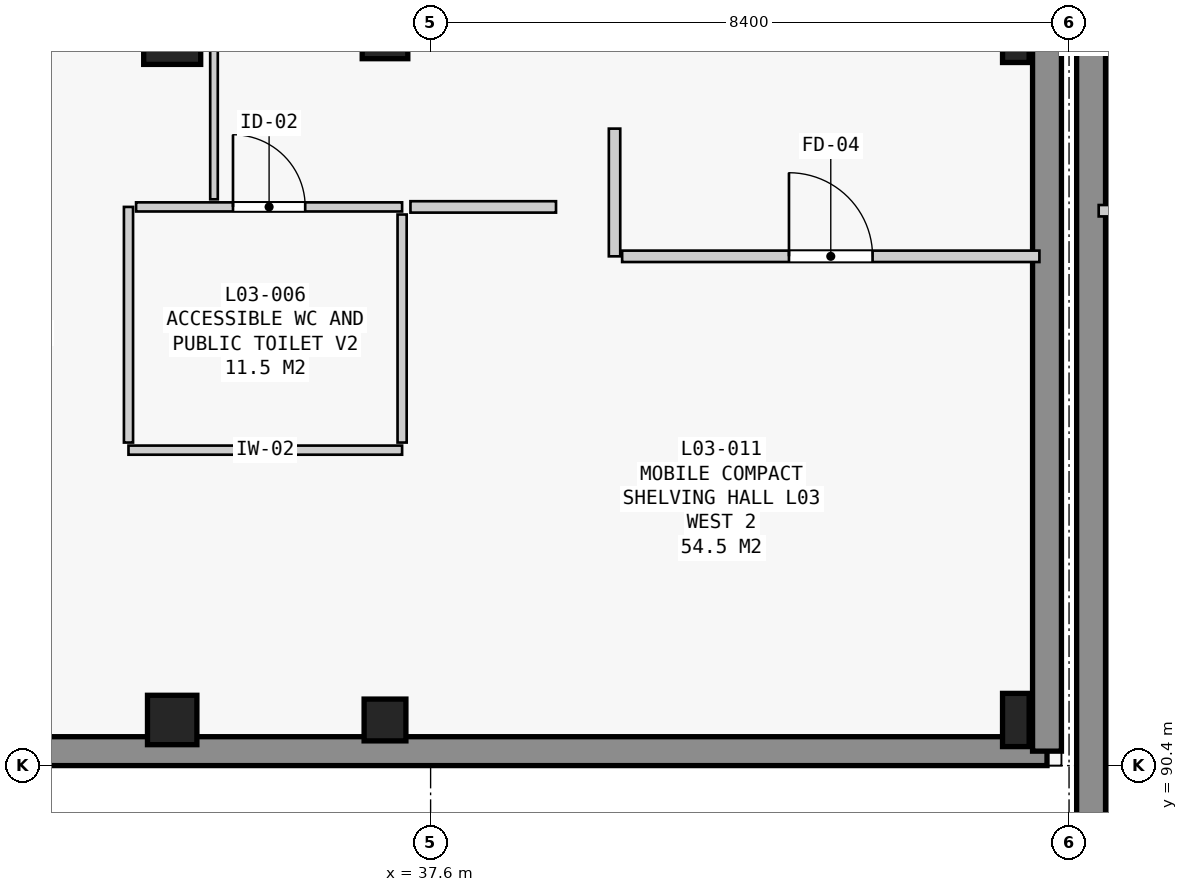
"""IFC4 building model, lengths in metres.
Left out: names, types, materials, properties, quantities, classifications, styles, units other than length and angle.
Written with IfcOpenShell. Run it as: python <this file> out.ifc"""

import sys

from ifc_helpers import new_model, si_unit, direction, frame, frame_2d, origin, origin_2d, place, context, subcontext, project, spatial, rectangle, extrude, element, fill, save


model = new_model("IFC4")
c1 = context("Model", 3, precision=1e-05, world=origin(), true_north=direction((0.0, 1.0)))
c2 = subcontext(c1, "Body", "Model", "MODEL_VIEW")
j1 = project(units=[si_unit("LENGTHUNIT", "METRE"), si_unit("PLANEANGLEUNIT", "RADIAN")], contexts=[c1])
p1 = place(None, origin())
s1 = spatial("IfcSite", under=j1, at=p1, CompositionType="ELEMENT")
p2 = place(p1, origin())
s2 = spatial("IfcBuilding", under=s1, at=p2, CompositionType="ELEMENT")
p3 = place(p2, frame((0.0, 0.0, 13.8)))
s3 = spatial("IfcBuildingStorey", under=s2, at=p3, CompositionType="ELEMENT", Elevation=13.8)
p4 = place(p3, frame((34.2, 91.0, 0.0), z_axis=(0.0, 0.0, 1.0), x_axis=(1.0, 0.0, 0.0)))
e1 = element("IfcColumn", 1, at=p4, inside=s3, PredefinedType="COLUMN", context=c2, shape_type="SweptSolid", body=[
    extrude(rectangle(XDim=0.65, YDim=0.65, at=origin_2d()), origin(), (0.0, 0.0, 1.0), 4.5),
])
p5 = place(p3, frame((34.2, 100.0, 0.0), z_axis=(0.0, 0.0, 1.0), x_axis=(1.0, 0.0, 0.0)))
e2 = element("IfcColumn", 2, at=p5, inside=s3, PredefinedType="COLUMN", context=c2, shape_type="SweptSolid", body=[
    extrude(rectangle(XDim=0.75, YDim=0.75, at=origin_2d()), origin(), (0.0, 0.0, 1.0), 4.5),
])
p6 = place(p3, frame((37.0, 91.0, 0.0), z_axis=(0.0, 0.0, 1.0), x_axis=(1.0, 0.0, 0.0)))
e3 = element("IfcColumn", 3, at=p6, inside=s3, PredefinedType="COLUMN", context=c2, shape_type="SweptSolid", body=[
    extrude(rectangle(XDim=0.55, YDim=0.55, at=origin_2d()), origin(), (0.0, 0.0, 1.0), 4.5),
])
p7 = place(p3, frame((37.0, 100.0, 0.0), z_axis=(0.0, 0.0, 1.0), x_axis=(1.0, 0.0, 0.0)))
e4 = element("IfcColumn", 4, at=p7, inside=s3, PredefinedType="COLUMN", context=c2, shape_type="SweptSolid", body=[
    extrude(rectangle(XDim=0.6, YDim=0.6, at=origin_2d()), origin(), (0.0, 0.0, 1.0), 4.5),
])
for number, where, z_axis, x_axis in (
    (5, (45.3, 91.0, 0.0), (0.0, 0.0, 1.0), (1.0, 0.0, 0.0)),
    (6, (45.3, 100.0, 0.0), (0.0, 0.0, 1.0), (1.0, 0.0, 0.0)),
):
    element("IfcColumn", number, at=place(p3, frame(where, z_axis=z_axis, x_axis=x_axis)), inside=s3, PredefinedType="COLUMN", context=c2, shape_type="SweptSolid", body=[
        extrude(rectangle(XDim=0.35, YDim=0.7, at=origin_2d()), origin(), (0.0, 0.0, 1.0), 4.5),
    ])
p8 = place(p3, frame((45.71, 90.59, 0.0), z_axis=(0.0, 0.0, 1.0), x_axis=(-1.0, 0.0, 0.0)))
e7 = element("IfcWall", 7, at=p8, inside=s3, PredefinedType="STANDARD", context=c2, shape_type="SweptSolid", body=[
    extrude(rectangle(XDim=33.12, YDim=0.38, at=frame_2d((16.56, 0.0))), origin(), (0.0, 0.0, 1.0), 4.18),
])
p9 = place(p3, frame((45.71, 117.81, 0.0), z_axis=(0.0, 0.0, 1.0), x_axis=(0.0, -1.0, 0.0)))
e8 = element("IfcWall", 8, at=p9, inside=s3, PredefinedType="STANDARD", context=c2, shape_type="SweptSolid", body=[
    extrude(rectangle(XDim=27.22, YDim=0.38, at=frame_2d((13.61, 0.0))), origin(), (0.0, 0.0, 1.0), 4.24),
])
p10 = place(p9, frame((15.11, 0.0, 0.0)))
e9 = element("IfcOpeningElement", 9, at=p10, cuts=e8, PredefinedType="OPENING", context=c2, shape_type="SweptSolid", body=[
    extrude(rectangle(XDim=1.8, YDim=2.2, at=frame_2d((0.9, 1.1))), frame((0.0, 0.2, 0.0), z_axis=(0.0, -1.0, 0.0), x_axis=(1.0, 0.0, 0.0)), (0.0, 0.0, 1.0), 0.4),
])
p11 = place(p3, frame((46.29, 76.29, 0.0), z_axis=(0.0, 0.0, 1.0), x_axis=(0.0, 1.0, 0.0)))
e10 = element("IfcWall", 10, at=p11, inside=s3, PredefinedType="STANDARD", context=c2, shape_type="SweptSolid", body=[
    extrude(rectangle(XDim=37.52, YDim=0.38, at=frame_2d((18.76, 0.0))), origin(), (0.0, 0.0, 1.0), 4.22),
])
p12 = place(p11, frame((24.61, 0.0, 0.0)))
e11 = element("IfcOpeningElement", 11, at=p12, cuts=e10, PredefinedType="OPENING", context=c2, shape_type="SweptSolid", body=[
    extrude(rectangle(XDim=1.8, YDim=2.2, at=frame_2d((0.9, 1.1))), frame((0.0, 0.2, 0.0), z_axis=(0.0, -1.0, 0.0), x_axis=(1.0, 0.0, 0.0)), (0.0, 0.0, 1.0), 0.4),
])
p13 = place(p3, frame((37.225, 94.55, 0.0), z_axis=(0.0, 0.0, 1.0), x_axis=(-1.0, 0.0, 0.0)))
e12 = element("IfcWall", 12, at=p13, inside=s3, PredefinedType="PARTITIONING", context=c2, shape_type="SweptSolid", body=[
    extrude(rectangle(XDim=3.6, YDim=0.12, at=frame_2d((1.8, 0.0))), origin(), (0.0, 0.0, 1.0), 3.36),
])
p14 = place(p3, frame((33.625, 94.65, 0.0), z_axis=(0.0, 0.0, 1.0), x_axis=(0.0, 1.0, 0.0)))
e13 = element("IfcWall", 13, at=p14, inside=s3, PredefinedType="PARTITIONING", context=c2, shape_type="SweptSolid", body=[
    extrude(rectangle(XDim=3.1, YDim=0.12, at=frame_2d((1.55, 0.0))), origin(), (0.0, 0.0, 1.0), 4.18),
])
p15 = place(p3, frame((33.725, 97.75, 0.0), z_axis=(0.0, 0.0, 1.0), x_axis=(1.0, 0.0, 0.0)))
e14 = element("IfcWall", 14, at=p15, inside=s3, PredefinedType="PARTITIONING", context=c2, shape_type="SweptSolid", body=[
    extrude(rectangle(XDim=3.5, YDim=0.12, at=frame_2d((1.75, 0.0))), origin(), (0.0, 0.0, 1.0), 3.36),
])
p16 = place(p15, frame((1.275, 0.0, 0.0)))
e15 = element("IfcOpeningElement", 15, at=p16, cuts=e14, PredefinedType="OPENING", context=c2, shape_type="SweptSolid", body=[
    extrude(rectangle(XDim=0.95, YDim=2.15, at=frame_2d((0.475, 1.075))), frame((0.0, 0.07, 0.0), z_axis=(0.0, -1.0, 0.0), x_axis=(1.0, 0.0, 0.0)), (0.0, 0.0, 1.0), 0.14),
])
p17 = place(p3, frame((37.225, 97.65, 0.0), z_axis=(0.0, 0.0, 1.0), x_axis=(0.0, -1.0, 0.0)))
e16 = element("IfcWall", 16, at=p17, inside=s3, PredefinedType="PARTITIONING", context=c2, shape_type="SweptSolid", body=[
    extrude(rectangle(XDim=3.0, YDim=0.12, at=frame_2d((1.5, 0.0))), origin(), (0.0, 0.0, 1.0), 3.37),
])
p18 = place(p3, frame((34.75, 102.15, 0.0), z_axis=(0.0, 0.0, 1.0), x_axis=(0.0, -1.0, 0.0)))
e17 = element("IfcWall", 17, at=p18, inside=s3, PredefinedType="PARTITIONING", context=c2, shape_type="SweptSolid", body=[
    extrude(rectangle(XDim=4.3, YDim=0.1, at=frame_2d((2.15, 0.0))), origin(), (0.0, 0.0, 1.0), 3.31),
])
p19 = place(p3, frame((40.02, 98.78, 0.0), z_axis=(0.0, 0.0, 1.0), x_axis=(0.0, -1.0, 0.0)))
e18 = element("IfcWall", 18, at=p19, inside=s3, PredefinedType="PARTITIONING", context=c2, shape_type="SweptSolid", body=[
    extrude(rectangle(XDim=1.68, YDim=0.15, at=frame_2d((0.84, 0.0))), origin(), (0.0, 0.0, 1.0), 4.18),
])
p20 = place(p3, frame((40.12, 97.1, 0.0), z_axis=(0.0, 0.0, 1.0), x_axis=(1.0, 0.0, 0.0)))
e19 = element("IfcWall", 19, at=p20, inside=s3, PredefinedType="PARTITIONING", context=c2, shape_type="SweptSolid", body=[
    extrude(rectangle(XDim=5.49, YDim=0.15, at=frame_2d((2.745, 0.0))), origin(), (0.0, 0.0, 1.0), 3.32),
])
p21 = place(p20, frame((2.195, 0.0, 0.0)))
e20 = element("IfcOpeningElement", 20, at=p21, cuts=e19, PredefinedType="OPENING", context=c2, shape_type="SweptSolid", body=[
    extrude(rectangle(XDim=1.1, YDim=2.15, at=frame_2d((0.55, 1.075))), frame((0.0, 0.085, 0.0), z_axis=(0.0, -1.0, 0.0), x_axis=(1.0, 0.0, 0.0)), (0.0, 0.0, 1.0), 0.17),
])
p22 = place(p3, frame((37.335, 97.75, 0.0), z_axis=(0.0, 0.0, 1.0), x_axis=(1.0, 0.0, 0.0)))
e21 = element("IfcWall", 21, at=p22, inside=s3, PredefinedType="PARTITIONING", context=c2, shape_type="SweptSolid", body=[
    extrude(rectangle(XDim=1.915, YDim=0.15, at=frame_2d((0.958, 0.0))), origin(), (0.0, 0.0, 1.0), 4.18),
])
p23 = place(p3, frame((46.39, 97.7, 0.0), z_axis=(0.0, 0.0, 1.0), x_axis=(1.0, 0.0, 0.0)))
e22 = element("IfcWall", 22, at=p23, inside=s3, PredefinedType="PARTITIONING", context=c2, shape_type="SweptSolid", body=[
    extrude(rectangle(XDim=2.485, YDim=0.15, at=frame_2d((1.243, 0.0))), origin(), (0.0, 0.0, 1.0), 2.715),
])
p24 = place(p16, origin())
e23 = element("IfcDoor", 23, at=p24, inside=s3, OperationType="SINGLE_SWING_LEFT", PredefinedType="DOOR", context=c2, shape_type="SweptSolid", body=[
    extrude(rectangle(XDim=0.95, YDim=2.15, at=frame_2d((0.475, 1.075))), frame((0.0, 0.025, 0.0), z_axis=(0.0, -1.0, 0.0), x_axis=(1.0, 0.0, 0.0)), (0.0, 0.0, 1.0), 0.05),
])
fill(e15, e23)
p25 = place(p21, origin())
e24 = element("IfcDoor", 24, at=p25, inside=s3, OperationType="SINGLE_SWING_LEFT", PredefinedType="DOOR", context=c2, shape_type="SweptSolid", body=[
    extrude(rectangle(XDim=1.1, YDim=2.15, at=frame_2d((0.55, 1.075))), frame((0.0, 0.025, 0.0), z_axis=(0.0, -1.0, 0.0), x_axis=(1.0, 0.0, 0.0)), (0.0, 0.0, 1.0), 0.05),
])
fill(e20, e24)
save(model, sys.argv[1])
